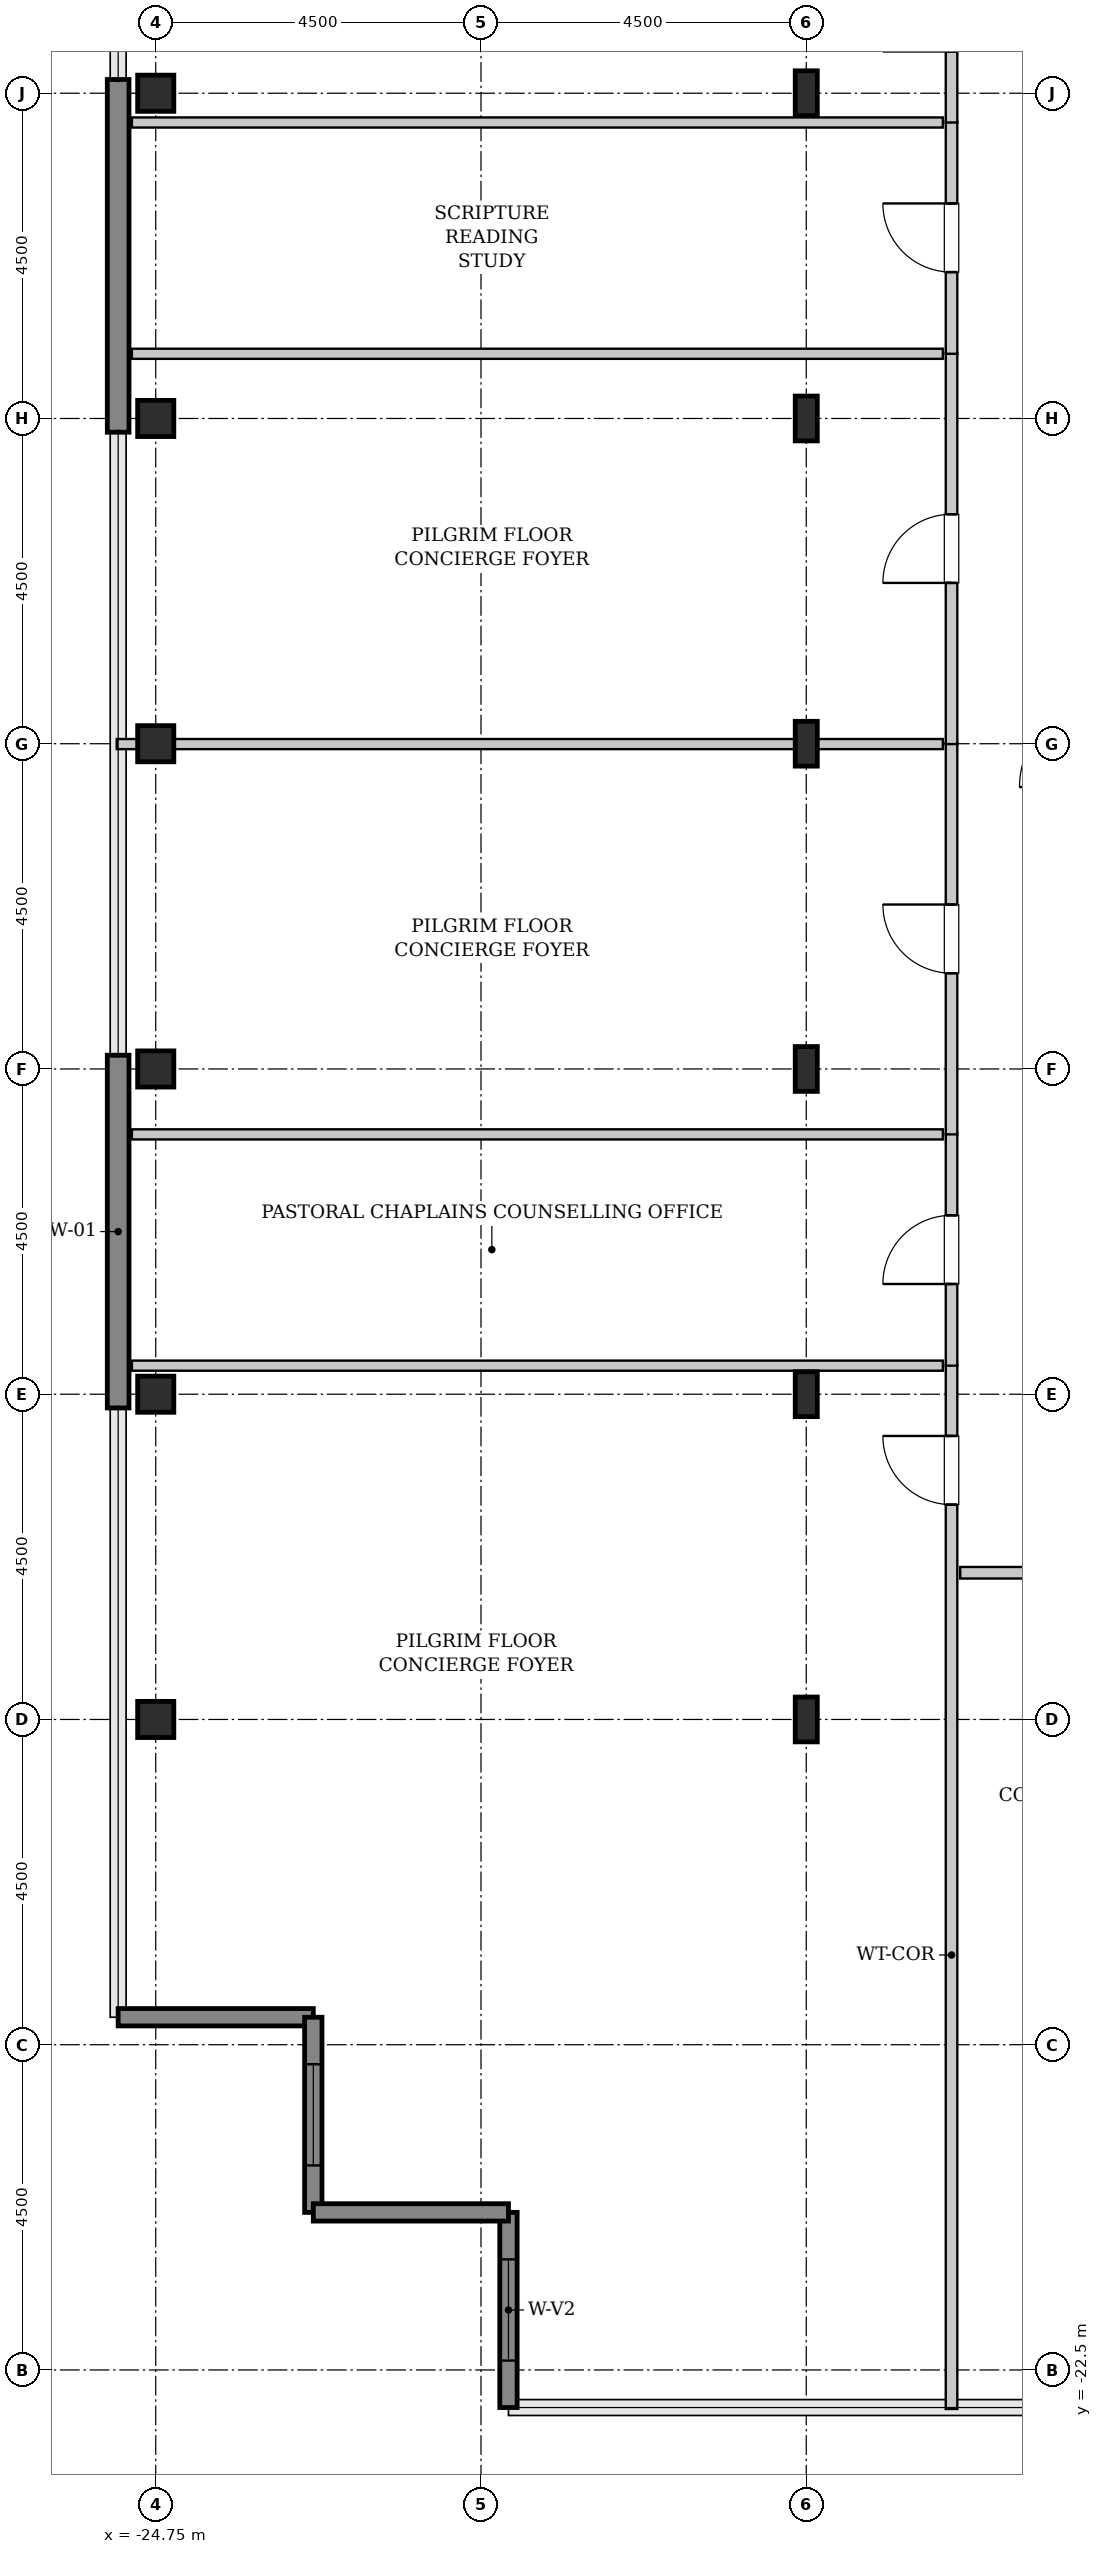
"""IFC4 building model, lengths in metres.
Left out: names, types, materials, properties, quantities, classifications, styles, units other than length and angle.
Written with IfcOpenShell. Run it as: python <this file> out.ifc"""

import sys

from ifc_helpers import new_model, si_unit, direction, frame, frame_2d, origin, origin_2d, place, context, subcontext, project, spatial, rectangle, hollow_rectangle, i_section, extrude, source, transform, mapped, element, fill, save


model = new_model("IFC4")
c1 = context("Model", 3, precision=1e-05, world=origin(), true_north=direction((0.0, 1.0)))
c2 = subcontext(c1, "Body", "Model", "MODEL_VIEW")
j1 = project(units=[si_unit("LENGTHUNIT", "METRE"), si_unit("PLANEANGLEUNIT", "RADIAN")], contexts=[c1])
p1 = place(None, origin())
s1 = spatial("IfcSite", under=j1, at=p1, CompositionType="ELEMENT")
p2 = place(p1, origin())
s2 = spatial("IfcBuilding", under=s1, at=p2, CompositionType="ELEMENT")
p3 = place(p2, frame((0.0, 0.0, 298.8)))
s3 = spatial("IfcBuildingStorey", under=s2, at=p3, CompositionType="ELEMENT", Elevation=298.8)
m1 = source(origin(), c2, "Body", "SweptSolid", [
    extrude(hollow_rectangle(XDim=0.5, YDim=0.5, WallThickness=0.025, InnerFilletRadius=0.025, OuterFilletRadius=0.05, at=origin_2d()), origin(), (0.0, 0.0, 1.0), 3.8),
])
for number, where, z_axis, x_axis in (
    (1, (-24.75, -13.5, 0.0), (0.0, 0.0, 1.0), (1.0, 0.0, 0.0)),
    (2, (-24.75, -9.0, 0.0), (0.0, 0.0, 1.0), (1.0, 0.0, 0.0)),
    (3, (-24.75, -4.5, 0.0), (0.0, 0.0, 1.0), (1.0, 0.0, 0.0)),
    (4, (-24.75, 0.0, 0.0), (0.0, 0.0, 1.0), (1.0, 0.0, 0.0)),
    (5, (-24.75, 4.5, 0.0), (0.0, 0.0, 1.0), (1.0, 0.0, 0.0)),
    (6, (-24.75, 9.0, 0.0), (0.0, 0.0, 1.0), (1.0, 0.0, 0.0)),
):
    element("IfcColumn", number, at=place(p3, frame(where, z_axis=z_axis, x_axis=x_axis)), inside=s3, PredefinedType="COLUMN", context=c2, shape_type="MappedRepresentation", body=[
        mapped(m1, transform((0.0, 0.0, 0.0), x_axis=(1.0, 0.0, 0.0), y_axis=(0.0, 1.0, 0.0), z_axis=(0.0, 0.0, 1.0), scale=1.0)),
    ])
m2 = source(origin(), c2, "Body", "SweptSolid", [
    extrude(i_section(OverallWidth=0.305, OverallDepth=0.62, WebThickness=0.021, FlangeThickness=0.04, FilletRadius=0.027, at=origin_2d()), origin(), (0.0, 0.0, 1.0), 3.8),
])
for number, where, z_axis, x_axis in (
    (7, (-15.75, -13.5, 0.0), (0.0, 0.0, 1.0), (1.0, 0.0, 0.0)),
    (8, (-15.75, -9.0, 0.0), (0.0, 0.0, 1.0), (1.0, 0.0, 0.0)),
    (9, (-15.75, -4.5, 0.0), (0.0, 0.0, 1.0), (1.0, 0.0, 0.0)),
    (10, (-15.75, 0.0, 0.0), (0.0, 0.0, 1.0), (1.0, 0.0, 0.0)),
    (11, (-15.75, 4.5, 0.0), (0.0, 0.0, 1.0), (1.0, 0.0, 0.0)),
    (12, (-15.75, 9.0, 0.0), (0.0, 0.0, 1.0), (1.0, 0.0, 0.0)),
):
    element("IfcColumn", number, at=place(p3, frame(where, z_axis=z_axis, x_axis=x_axis)), inside=s3, PredefinedType="COLUMN", context=c2, shape_type="MappedRepresentation", body=[
        mapped(m2, transform((0.0, 0.0, 0.0), x_axis=(1.0, 0.0, 0.0), y_axis=(0.0, 1.0, 0.0), z_axis=(0.0, 0.0, 1.0), scale=1.0)),
    ])
m3 = source(origin(), c2, "Body", "SweptSolid", [
    extrude(rectangle(XDim=4.88, YDim=0.3, at=frame_2d((2.44, 0.0))), origin(), (0.0, 0.0, 1.0), 3.55),
])
for number, where, z_axis, x_axis in (
    (13, (-25.27, -9.19, 0.0), (0.0, 0.0, 1.0), (0.0, 1.0, 0.0)),
    (14, (-25.27, 4.31, 0.0), (0.0, 0.0, 1.0), (0.0, 1.0, 0.0)),
):
    element("IfcWall", number, at=place(p3, frame(where, z_axis=z_axis, x_axis=x_axis)), inside=s3, PredefinedType="SHEAR", context=c2, shape_type="MappedRepresentation", body=[
        mapped(m3, transform((0.0, 0.0, 0.0), x_axis=(1.0, 0.0, 0.0), y_axis=(0.0, 1.0, 0.0), z_axis=(0.0, 0.0, 1.0), scale=1.0)),
    ])
m4 = source(origin(), c2, "Body", "SweptSolid", [
    extrude(rectangle(XDim=2.7, YDim=0.24, at=frame_2d((1.35, 0.0))), origin(), (0.0, 0.0, 1.0), 3.55),
])
p4 = place(p3, frame((-19.87, -20.32, 0.0), z_axis=(0.0, 0.0, 1.0), x_axis=(0.0, -1.0, 0.0)))
e15 = element("IfcWall", 15, at=p4, inside=s3, PredefinedType="SHEAR", context=c2, shape_type="MappedRepresentation", body=[
    mapped(m4, transform((0.0, 0.0, 0.0), x_axis=(1.0, 0.0, 0.0), y_axis=(0.0, 1.0, 0.0), z_axis=(0.0, 0.0, 1.0), scale=1.0)),
])
p5 = place(p4, frame((0.65, 0.0, 0.85)))
e16 = element("IfcOpeningElement", 16, at=p5, cuts=e15, PredefinedType="OPENING", context=c2, shape_type="SweptSolid", body=[
    extrude(rectangle(XDim=1.4, YDim=1.8, at=frame_2d((0.7, 0.9))), frame((0.0, 0.13, 0.0), z_axis=(0.0, -1.0, 0.0), x_axis=(1.0, 0.0, 0.0)), (0.0, 0.0, 1.0), 0.26),
])
p6 = place(p3, frame((-25.27, -17.62, 0.0), z_axis=(0.0, 0.0, 1.0), x_axis=(1.0, 0.0, 0.0)))
e17 = element("IfcWall", 17, at=p6, inside=s3, PredefinedType="SHEAR", context=c2, shape_type="MappedRepresentation", body=[
    mapped(m4, transform((0.0, 0.0, 0.0), x_axis=(1.0, 0.0, 0.0), y_axis=(0.0, 1.0, 0.0), z_axis=(0.0, 0.0, 1.0), scale=1.0)),
])
p7 = place(p3, frame((-22.57, -17.62, 0.0), z_axis=(0.0, 0.0, 1.0), x_axis=(0.0, -1.0, 0.0)))
e18 = element("IfcWall", 18, at=p7, inside=s3, PredefinedType="SHEAR", context=c2, shape_type="MappedRepresentation", body=[
    mapped(m4, transform((0.0, 0.0, 0.0), x_axis=(1.0, 0.0, 0.0), y_axis=(0.0, 1.0, 0.0), z_axis=(0.0, 0.0, 1.0), scale=1.0)),
])
p8 = place(p7, frame((0.65, 0.0, 0.85)))
e19 = element("IfcOpeningElement", 19, at=p8, cuts=e18, PredefinedType="OPENING", context=c2, shape_type="SweptSolid", body=[
    extrude(rectangle(XDim=1.4, YDim=1.8, at=frame_2d((0.7, 0.9))), frame((0.0, 0.13, 0.0), z_axis=(0.0, -1.0, 0.0), x_axis=(1.0, 0.0, 0.0)), (0.0, 0.0, 1.0), 0.26),
])
p9 = place(p3, frame((-22.57, -20.32, 0.0), z_axis=(0.0, 0.0, 1.0), x_axis=(1.0, 0.0, 0.0)))
e20 = element("IfcWall", 20, at=p9, inside=s3, PredefinedType="SHEAR", context=c2, shape_type="MappedRepresentation", body=[
    mapped(m4, transform((0.0, 0.0, 0.0), x_axis=(1.0, 0.0, 0.0), y_axis=(0.0, 1.0, 0.0), z_axis=(0.0, 0.0, 1.0), scale=1.0)),
])
m5 = source(origin(), c2, "Body", "SweptSolid", [
    extrude(rectangle(XDim=14.445, YDim=0.16, at=frame_2d((7.223, 0.0))), origin(), (0.0, 0.0, 1.0), 3.535),
])
p10 = place(p3, frame((-13.74, -23.04, 0.0), z_axis=(0.0, 0.0, 1.0), x_axis=(0.0, 1.0, 0.0)))
e21 = element("IfcWall", 21, at=p10, inside=s3, PredefinedType="PARTITIONING", context=c2, shape_type="MappedRepresentation", body=[
    mapped(m5, transform((0.0, 0.0, 0.0), x_axis=(1.0, 0.0, 0.0), y_axis=(0.0, 1.0, 0.0), z_axis=(0.0, 0.0, 1.0), scale=1.0)),
])
p11 = place(p10, frame((12.512, 0.0, 0.0)))
e22 = element("IfcOpeningElement", 22, at=p11, cuts=e21, PredefinedType="OPENING", context=c2, shape_type="SweptSolid", body=[
    extrude(rectangle(XDim=0.95, YDim=2.1, at=frame_2d((0.475, 1.05))), frame((0.0, 0.09, 0.0), z_axis=(0.0, -1.0, 0.0), x_axis=(1.0, 0.0, 0.0)), (0.0, 0.0, 1.0), 0.18),
])
m6 = source(origin(), c2, "Body", "SweptSolid", [
    extrude(rectangle(XDim=11.22, YDim=0.14, at=frame_2d((5.61, 0.0))), origin(), (0.0, 0.0, 1.0), 2.925),
])
p12 = place(p3, frame((-25.08, -8.605, 0.0), z_axis=(0.0, 0.0, 1.0), x_axis=(1.0, 0.0, 0.0)))
e23 = element("IfcWall", 23, at=p12, inside=s3, PredefinedType="PARTITIONING", context=c2, shape_type="MappedRepresentation", body=[
    mapped(m6, transform((0.0, 0.0, 0.0), x_axis=(1.0, 0.0, 0.0), y_axis=(0.0, 1.0, 0.0), z_axis=(0.0, 0.0, 1.0), scale=1.0)),
])
m7 = source(origin(), c2, "Body", "SweptSolid", [
    extrude(rectangle(XDim=3.21, YDim=0.16, at=frame_2d((1.605, 0.0))), origin(), (0.0, 0.0, 1.0), 3.535),
])
p13 = place(p3, frame((-13.74, -8.605, 0.0), z_axis=(0.0, 0.0, 1.0), x_axis=(0.0, 1.0, 0.0)))
e24 = element("IfcWall", 24, at=p13, inside=s3, PredefinedType="PARTITIONING", context=c2, shape_type="MappedRepresentation", body=[
    mapped(m7, transform((0.0, 0.0, 0.0), x_axis=(1.0, 0.0, 0.0), y_axis=(0.0, 1.0, 0.0), z_axis=(0.0, 0.0, 1.0), scale=1.0)),
])
p14 = place(p13, frame((1.13, 0.0, 0.0)))
e25 = element("IfcOpeningElement", 25, at=p14, cuts=e24, PredefinedType="OPENING", context=c2, shape_type="SweptSolid", body=[
    extrude(rectangle(XDim=0.95, YDim=2.1, at=frame_2d((0.475, 1.05))), frame((0.0, 0.09, 0.0), z_axis=(0.0, -1.0, 0.0), x_axis=(1.0, 0.0, 0.0)), (0.0, 0.0, 1.0), 0.18),
])
m8 = source(origin(), c2, "Body", "SweptSolid", [
    extrude(rectangle(XDim=11.22, YDim=0.14, at=frame_2d((5.61, 0.0))), origin(), (0.0, 0.0, 1.0), 3.535),
])
p15 = place(p3, frame((-25.08, -5.405, 0.0), z_axis=(0.0, 0.0, 1.0), x_axis=(1.0, 0.0, 0.0)))
e26 = element("IfcWall", 26, at=p15, inside=s3, PredefinedType="PARTITIONING", context=c2, shape_type="MappedRepresentation", body=[
    mapped(m8, transform((0.0, 0.0, 0.0), x_axis=(1.0, 0.0, 0.0), y_axis=(0.0, 1.0, 0.0), z_axis=(0.0, 0.0, 1.0), scale=1.0)),
])
m9 = source(origin(), c2, "Body", "SweptSolid", [
    extrude(rectangle(XDim=5.41, YDim=0.16, at=frame_2d((2.705, 0.0))), origin(), (0.0, 0.0, 1.0), 3.535),
])
p16 = place(p3, frame((-13.74, -5.405, 0.0), z_axis=(0.0, 0.0, 1.0), x_axis=(0.0, 1.0, 0.0)))
e27 = element("IfcWall", 27, at=p16, inside=s3, PredefinedType="PARTITIONING", context=c2, shape_type="MappedRepresentation", body=[
    mapped(m9, transform((0.0, 0.0, 0.0), x_axis=(1.0, 0.0, 0.0), y_axis=(0.0, 1.0, 0.0), z_axis=(0.0, 0.0, 1.0), scale=1.0)),
])
p17 = place(p16, frame((2.23, 0.0, 0.0)))
e28 = element("IfcOpeningElement", 28, at=p17, cuts=e27, PredefinedType="OPENING", context=c2, shape_type="SweptSolid", body=[
    extrude(rectangle(XDim=0.95, YDim=2.1, at=frame_2d((0.475, 1.05))), frame((0.0, 0.09, 0.0), z_axis=(0.0, -1.0, 0.0), x_axis=(1.0, 0.0, 0.0)), (0.0, 0.0, 1.0), 0.18),
])
m10 = source(origin(), c2, "Body", "SweptSolid", [
    extrude(rectangle(XDim=11.43, YDim=0.14, at=frame_2d((5.715, 0.0))), origin(), (0.0, 0.0, 1.0), 2.925),
])
p18 = place(p3, frame((-25.29, -0.005, 0.0), z_axis=(0.0, 0.0, 1.0), x_axis=(1.0, 0.0, 0.0)))
e29 = element("IfcWall", 29, at=p18, inside=s3, PredefinedType="PARTITIONING", context=c2, shape_type="MappedRepresentation", body=[
    mapped(m10, transform((0.0, 0.0, 0.0), x_axis=(1.0, 0.0, 0.0), y_axis=(0.0, 1.0, 0.0), z_axis=(0.0, 0.0, 1.0), scale=1.0)),
])
p19 = place(p3, frame((-13.74, -0.005, 0.0), z_axis=(0.0, 0.0, 1.0), x_axis=(0.0, 1.0, 0.0)))
e30 = element("IfcWall", 30, at=p19, inside=s3, PredefinedType="PARTITIONING", context=c2, shape_type="MappedRepresentation", body=[
    mapped(m9, transform((0.0, 0.0, 0.0), x_axis=(1.0, 0.0, 0.0), y_axis=(0.0, 1.0, 0.0), z_axis=(0.0, 0.0, 1.0), scale=1.0)),
])
p20 = place(p19, frame((2.23, 0.0, 0.0)))
e31 = element("IfcOpeningElement", 31, at=p20, cuts=e30, PredefinedType="OPENING", context=c2, shape_type="SweptSolid", body=[
    extrude(rectangle(XDim=0.95, YDim=2.1, at=frame_2d((0.475, 1.05))), frame((0.0, 0.09, 0.0), z_axis=(0.0, -1.0, 0.0), x_axis=(1.0, 0.0, 0.0)), (0.0, 0.0, 1.0), 0.18),
])
p21 = place(p3, frame((-25.08, 5.395, 0.0), z_axis=(0.0, 0.0, 1.0), x_axis=(1.0, 0.0, 0.0)))
e32 = element("IfcWall", 32, at=p21, inside=s3, PredefinedType="PARTITIONING", context=c2, shape_type="MappedRepresentation", body=[
    mapped(m8, transform((0.0, 0.0, 0.0), x_axis=(1.0, 0.0, 0.0), y_axis=(0.0, 1.0, 0.0), z_axis=(0.0, 0.0, 1.0), scale=1.0)),
])
p22 = place(p3, frame((-13.74, 5.395, 0.0), z_axis=(0.0, 0.0, 1.0), x_axis=(0.0, 1.0, 0.0)))
e33 = element("IfcWall", 33, at=p22, inside=s3, PredefinedType="PARTITIONING", context=c2, shape_type="MappedRepresentation", body=[
    mapped(m7, transform((0.0, 0.0, 0.0), x_axis=(1.0, 0.0, 0.0), y_axis=(0.0, 1.0, 0.0), z_axis=(0.0, 0.0, 1.0), scale=1.0)),
])
p23 = place(p22, frame((1.13, 0.0, 0.0)))
e34 = element("IfcOpeningElement", 34, at=p23, cuts=e33, PredefinedType="OPENING", context=c2, shape_type="SweptSolid", body=[
    extrude(rectangle(XDim=0.95, YDim=2.1, at=frame_2d((0.475, 1.05))), frame((0.0, 0.09, 0.0), z_axis=(0.0, -1.0, 0.0), x_axis=(1.0, 0.0, 0.0)), (0.0, 0.0, 1.0), 0.18),
])
p24 = place(p3, frame((-25.08, 8.595, 0.0), z_axis=(0.0, 0.0, 1.0), x_axis=(1.0, 0.0, 0.0)))
e35 = element("IfcWall", 35, at=p24, inside=s3, PredefinedType="PARTITIONING", context=c2, shape_type="MappedRepresentation", body=[
    mapped(m6, transform((0.0, 0.0, 0.0), x_axis=(1.0, 0.0, 0.0), y_axis=(0.0, 1.0, 0.0), z_axis=(0.0, 0.0, 1.0), scale=1.0)),
])
m11 = source(origin(), c2, "Body", "SweptSolid", [
    extrude(rectangle(XDim=12.645, YDim=0.16, at=frame_2d((6.323, 0.0))), origin(), (0.0, 0.0, 1.0), 3.535),
])
p25 = place(p3, frame((-13.74, 8.595, 0.0), z_axis=(0.0, 0.0, 1.0), x_axis=(0.0, 1.0, 0.0)))
e36 = element("IfcWall", 36, at=p25, inside=s3, PredefinedType="PARTITIONING", context=c2, shape_type="MappedRepresentation", body=[
    mapped(m11, transform((0.0, 0.0, 0.0), x_axis=(1.0, 0.0, 0.0), y_axis=(0.0, 1.0, 0.0), z_axis=(0.0, 0.0, 1.0), scale=1.0)),
])
p26 = place(p25, frame((0.982, 0.0, 0.0)))
e37 = element("IfcOpeningElement", 37, at=p26, cuts=e36, PredefinedType="OPENING", context=c2, shape_type="SweptSolid", body=[
    extrude(rectangle(XDim=0.95, YDim=2.1, at=frame_2d((0.475, 1.05))), frame((0.0, 0.09, 0.0), z_axis=(0.0, -1.0, 0.0), x_axis=(1.0, 0.0, 0.0)), (0.0, 0.0, 1.0), 0.18),
])
m12 = source(origin(), c2, "Body", "SweptSolid", [
    extrude(rectangle(XDim=3.56, YDim=0.16, at=frame_2d((1.78, 0.0))), origin(), (0.0, 0.0, 1.0), 3.535),
])
p27 = place(p3, frame((-13.62, -11.47, 0.0), z_axis=(0.0, 0.0, 1.0), x_axis=(1.0, 0.0, 0.0)))
e38 = element("IfcWall", 38, at=p27, inside=s3, PredefinedType="PARTITIONING", context=c2, shape_type="MappedRepresentation", body=[
    mapped(m12, transform((0.0, 0.0, 0.0), x_axis=(1.0, 0.0, 0.0), y_axis=(0.0, 1.0, 0.0), z_axis=(0.0, 0.0, 1.0), scale=1.0)),
])
p28 = place(p27, frame((1.305, 0.0, 0.0)))
e39 = element("IfcOpeningElement", 39, at=p28, cuts=e38, PredefinedType="OPENING", context=c2, shape_type="SweptSolid", body=[
    extrude(rectangle(XDim=0.95, YDim=2.1, at=frame_2d((0.475, 1.05))), frame((0.0, 0.09, 0.0), z_axis=(0.0, -1.0, 0.0), x_axis=(1.0, 0.0, 0.0)), (0.0, 0.0, 1.0), 0.18),
])
m13 = source(origin(), c2, "Body", "SweptSolid", [
    extrude(rectangle(XDim=1.4, YDim=1.8, at=frame_2d((0.7, 0.9))), frame((0.0, 0.03, 0.0), z_axis=(0.0, -1.0, 0.0), x_axis=(1.0, 0.0, 0.0)), (0.0, 0.0, 1.0), 0.06),
])
p29 = place(p5, origin())
e40 = element("IfcWindow", 40, at=p29, inside=s3, PartitioningType="SINGLE_PANEL", PredefinedType="WINDOW", context=c2, shape_type="MappedRepresentation", body=[
    mapped(m13, transform((0.0, 0.0, 0.0), x_axis=(1.0, 0.0, 0.0), y_axis=(0.0, 1.0, 0.0), z_axis=(0.0, 0.0, 1.0), scale=1.0)),
])
fill(e16, e40)
p30 = place(p8, origin())
e41 = element("IfcWindow", 41, at=p30, inside=s3, PartitioningType="SINGLE_PANEL", PredefinedType="WINDOW", context=c2, shape_type="MappedRepresentation", body=[
    mapped(m13, transform((0.0, 0.0, 0.0), x_axis=(1.0, 0.0, 0.0), y_axis=(0.0, 1.0, 0.0), z_axis=(0.0, 0.0, 1.0), scale=1.0)),
])
fill(e19, e41)
m14 = source(origin(), c2, "Body", "SweptSolid", [
    extrude(rectangle(XDim=0.95, YDim=2.1, at=frame_2d((0.475, 1.05))), frame((0.0, 0.025, 0.0), z_axis=(0.0, -1.0, 0.0), x_axis=(1.0, 0.0, 0.0)), (0.0, 0.0, 1.0), 0.05),
])
p31 = place(p11, origin())
e42 = element("IfcDoor", 42, at=p31, inside=s3, OperationType="SINGLE_SWING_RIGHT", PredefinedType="DOOR", context=c2, shape_type="MappedRepresentation", body=[
    mapped(m14, transform((0.0, 0.0, 0.0), x_axis=(1.0, 0.0, 0.0), y_axis=(0.0, 1.0, 0.0), z_axis=(0.0, 0.0, 1.0), scale=1.0)),
])
fill(e22, e42)
p32 = place(p14, origin())
e43 = element("IfcDoor", 43, at=p32, inside=s3, OperationType="SINGLE_SWING_LEFT", PredefinedType="DOOR", context=c2, shape_type="MappedRepresentation", body=[
    mapped(m14, transform((0.0, 0.0, 0.0), x_axis=(1.0, 0.0, 0.0), y_axis=(0.0, 1.0, 0.0), z_axis=(0.0, 0.0, 1.0), scale=1.0)),
])
fill(e25, e43)
p33 = place(p17, origin())
e44 = element("IfcDoor", 44, at=p33, inside=s3, OperationType="SINGLE_SWING_RIGHT", PredefinedType="DOOR", context=c2, shape_type="MappedRepresentation", body=[
    mapped(m14, transform((0.0, 0.0, 0.0), x_axis=(1.0, 0.0, 0.0), y_axis=(0.0, 1.0, 0.0), z_axis=(0.0, 0.0, 1.0), scale=1.0)),
])
fill(e28, e44)
p34 = place(p20, origin())
e45 = element("IfcDoor", 45, at=p34, inside=s3, OperationType="SINGLE_SWING_LEFT", PredefinedType="DOOR", context=c2, shape_type="MappedRepresentation", body=[
    mapped(m14, transform((0.0, 0.0, 0.0), x_axis=(1.0, 0.0, 0.0), y_axis=(0.0, 1.0, 0.0), z_axis=(0.0, 0.0, 1.0), scale=1.0)),
])
fill(e31, e45)
p35 = place(p23, origin())
e46 = element("IfcDoor", 46, at=p35, inside=s3, OperationType="SINGLE_SWING_RIGHT", PredefinedType="DOOR", context=c2, shape_type="MappedRepresentation", body=[
    mapped(m14, transform((0.0, 0.0, 0.0), x_axis=(1.0, 0.0, 0.0), y_axis=(0.0, 1.0, 0.0), z_axis=(0.0, 0.0, 1.0), scale=1.0)),
])
fill(e34, e46)
save(model, sys.argv[1])
